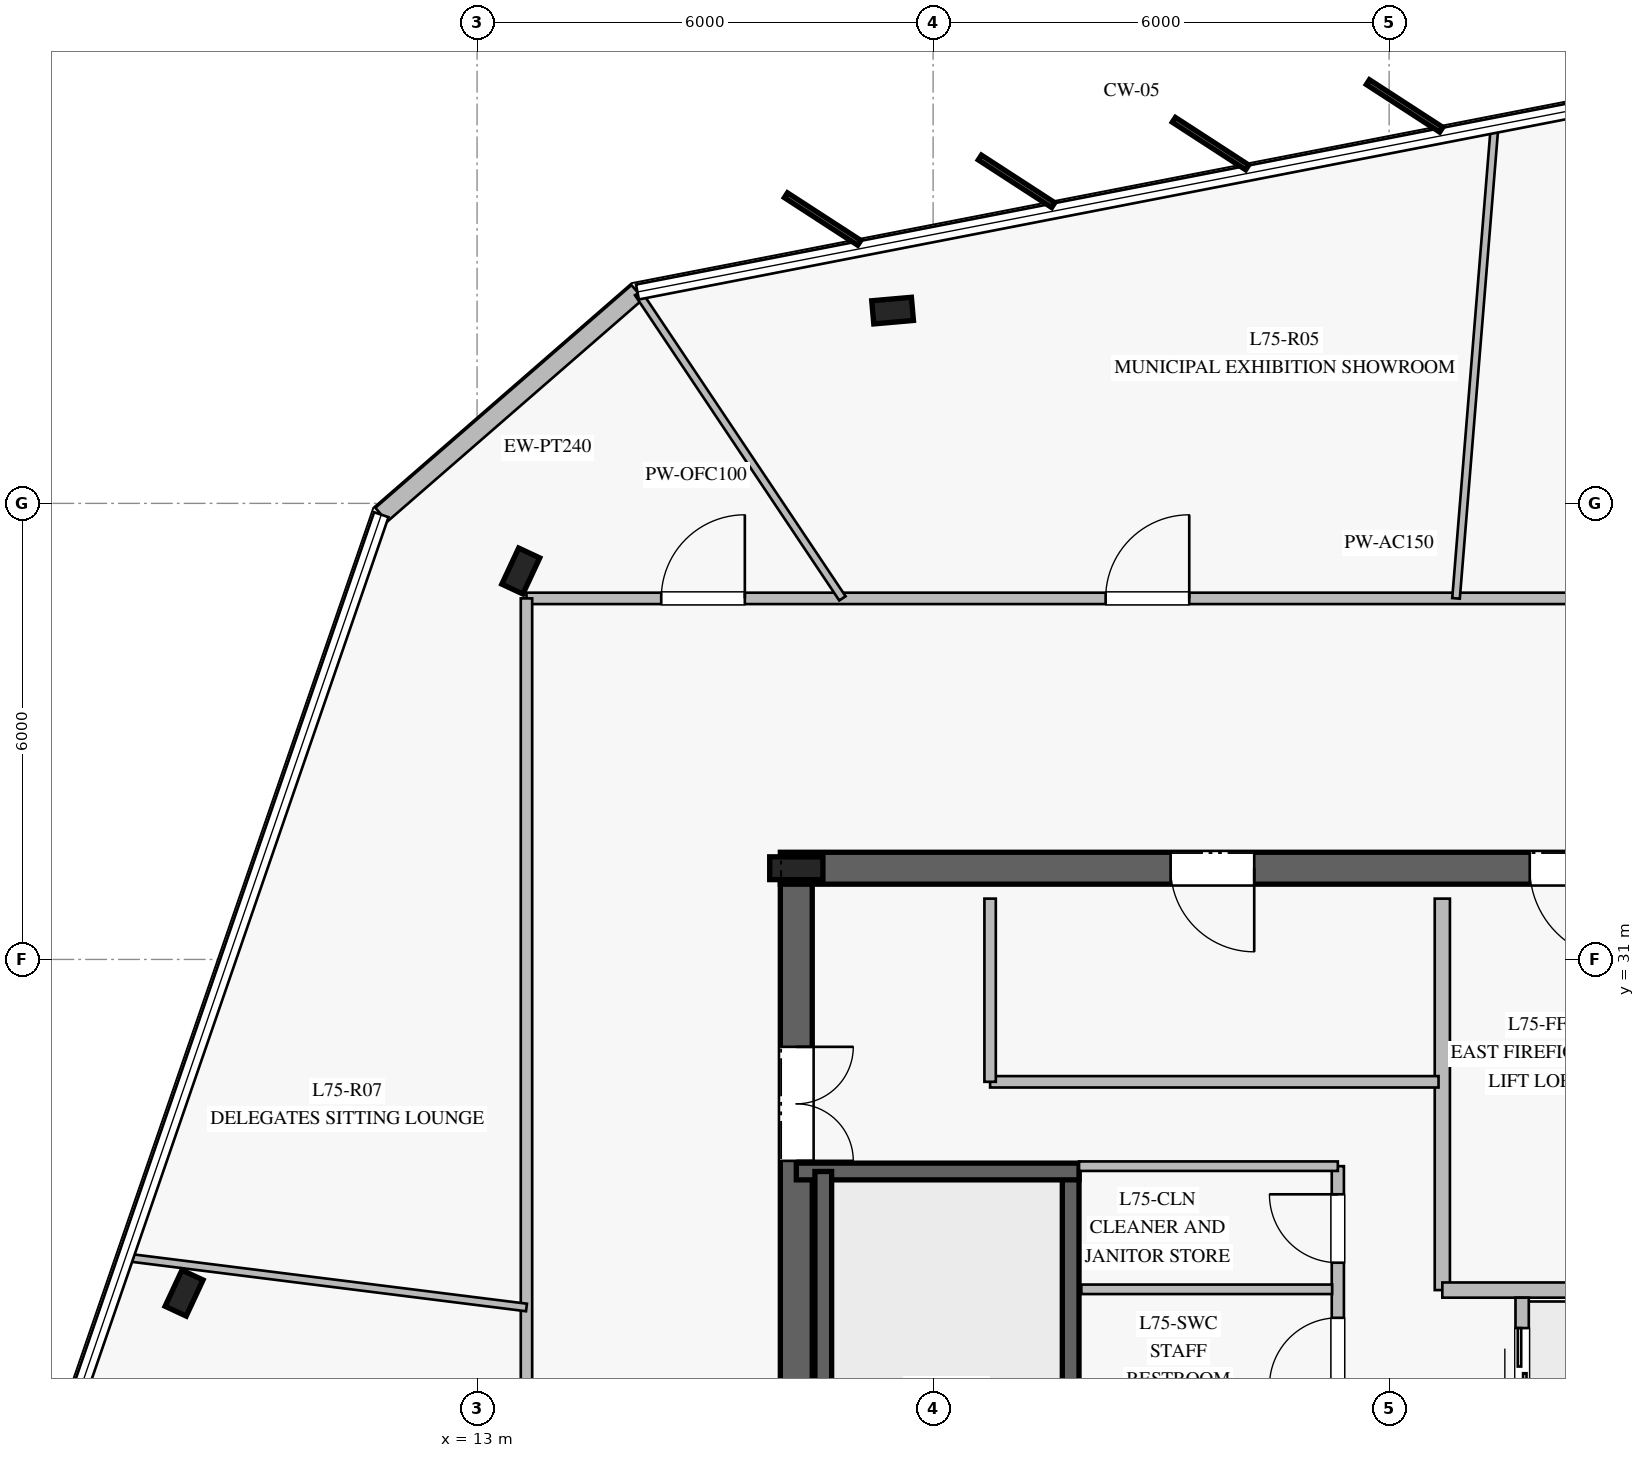
"""IFC4 building model, lengths in metres.
Left out: names, types, materials, properties, quantities, classifications, styles, units other than length and angle.
Written with IfcOpenShell. Run it as: python <this file> out.ifc"""

import sys

from ifc_helpers import new_model, si_unit, direction, frame, frame_2d, origin, origin_2d, place, context, subcontext, project, spatial, rectangle, i_section, extrude, element, fill, save


model = new_model("IFC4")
c1 = context("Model", 3, precision=1e-05, world=origin(), true_north=direction((0.0, 1.0)))
c2 = subcontext(c1, "Body", "Model", "MODEL_VIEW")
j1 = project(units=[si_unit("LENGTHUNIT", "METRE"), si_unit("PLANEANGLEUNIT", "RADIAN")], contexts=[c1])
p1 = place(None, origin())
s1 = spatial("IfcSite", under=j1, at=p1, CompositionType="ELEMENT")
p2 = place(p1, origin())
s2 = spatial("IfcBuilding", under=s1, at=p2, CompositionType="ELEMENT")
p3 = place(p2, frame((0.0, 0.0, 310.2)))
s3 = spatial("IfcBuildingStorey", under=s2, at=p3, CompositionType="ELEMENT", Elevation=310.2)
p4 = place(p3, frame((33.01, 32.2, 0.0), z_axis=(0.0, 0.0, 1.0), x_axis=(-1.0, 0.0, 0.0)))
e1 = element("IfcWall", 1, at=p4, inside=s3, PredefinedType="SHEAR", context=c2, shape_type="SweptSolid", body=[
    extrude(rectangle(XDim=16.02, YDim=0.42, at=frame_2d((8.01, 0.0))), origin(), (0.0, 0.0, 1.0), 3.78),
])
p5 = place(p4, frame((4.96, 0.0, 0.0)))
e2 = element("IfcOpeningElement", 2, at=p5, cuts=e1, PredefinedType="OPENING", context=c2, shape_type="SweptSolid", body=[
    extrude(rectangle(XDim=1.2, YDim=2.25, at=frame_2d((0.6, 1.125))), frame((0.0, 0.22, 0.0), z_axis=(0.0, -1.0, 0.0), x_axis=(1.0, 0.0, 0.0)), (0.0, 0.0, 1.0), 0.44),
])
p6 = place(p4, frame((9.785, 0.0, 0.0)))
e3 = element("IfcOpeningElement", 3, at=p6, cuts=e1, PredefinedType="OPENING", context=c2, shape_type="SweptSolid", body=[
    extrude(rectangle(XDim=1.1, YDim=2.2, at=frame_2d((0.55, 1.1))), frame((0.0, 0.22, 0.0), z_axis=(0.0, -1.0, 0.0), x_axis=(1.0, 0.0, 0.0)), (0.0, 0.0, 1.0), 0.44),
])
p7 = place(p3, frame((17.2, 31.99, 0.0), z_axis=(0.0, 0.0, 1.0), x_axis=(0.0, -1.0, 0.0)))
e4 = element("IfcWall", 4, at=p7, inside=s3, PredefinedType="SHEAR", context=c2, shape_type="SweptSolid", body=[
    extrude(rectangle(XDim=13.98, YDim=0.42, at=frame_2d((6.99, 0.0))), origin(), (0.0, 0.0, 1.0), 3.78),
])
p8 = place(p7, frame((2.14, 0.0, 0.0)))
e5 = element("IfcOpeningElement", 5, at=p8, cuts=e4, PredefinedType="OPENING", context=c2, shape_type="SweptSolid", body=[
    extrude(rectangle(XDim=1.5, YDim=2.2, at=frame_2d((0.75, 1.1))), frame((0.0, 0.22, 0.0), z_axis=(0.0, -1.0, 0.0), x_axis=(1.0, 0.0, 0.0)), (0.0, 0.0, 1.0), 0.44),
])
p9 = place(p3, frame((17.2, 32.2, 0.0), z_axis=(0.0, 0.0, 1.0), x_axis=(1.0, 0.0, 0.0)))
e6 = element("IfcColumn", 6, at=p9, inside=s3, PredefinedType="COLUMN", context=c2, shape_type="SweptSolid", body=[
    extrude(i_section(OverallWidth=0.3, OverallDepth=0.7, WebThickness=0.017, FlangeThickness=0.032, at=origin_2d()), origin(), (0.0, 0.0, 1.0), 4.0),
])
p10 = place(p3, frame((20.81, 20.99, 0.0), z_axis=(0.0, 0.0, 1.0), x_axis=(0.0, 1.0, 0.0)))
e7 = element("IfcWall", 7, at=p10, inside=s3, PredefinedType="SOLIDWALL", context=c2, shape_type="SweptSolid", body=[
    extrude(rectangle(XDim=7.22, YDim=0.22, at=frame_2d((3.61, 0.0))), origin(), (0.0, 0.0, 1.0), 3.78),
])
p11 = place(p10, frame((0.18, 0.0, 0.0)))
e8 = element("IfcOpeningElement", 8, at=p11, cuts=e7, PredefinedType="OPENING", context=c2, shape_type="SweptSolid", body=[
    extrude(rectangle(XDim=1.15, YDim=2.2, at=frame_2d((0.575, 1.1))), frame((0.0, 0.12, 0.0), z_axis=(0.0, -1.0, 0.0), x_axis=(1.0, 0.0, 0.0)), (0.0, 0.0, 1.0), 0.24),
])
p12 = place(p3, frame((17.2, 28.21, 0.0), z_axis=(0.0, 0.0, 1.0), x_axis=(1.0, 0.0, 0.0)))
e9 = element("IfcWall", 9, at=p12, inside=s3, PredefinedType="SOLIDWALL", context=c2, shape_type="SweptSolid", body=[
    extrude(rectangle(XDim=3.72, YDim=0.22, at=frame_2d((1.86, 0.0))), origin(), (0.0, 0.0, 1.0), 3.78),
])
p13 = place(p3, frame((17.555, 28.21, 0.0), z_axis=(0.0, 0.0, 1.0), x_axis=(0.0, -1.0, 0.0)))
e10 = element("IfcWall", 10, at=p13, inside=s3, PredefinedType="SOLIDWALL", context=c2, shape_type="SweptSolid", body=[
    extrude(rectangle(XDim=7.22, YDim=0.22, at=frame_2d((3.61, 0.0))), origin(), (0.0, 0.0, 1.0), 3.78),
])
for number, where, z_axis, x_axis in (
    (11, (18.467, 39.536, 0.0), (0.0, 0.0, 1.0), (0.996, 0.087, 0.0)),
    (12, (13.575, 36.11, 0.0), (0.0, 0.0, 1.0), (0.423, 0.906, 0.0)),
    (13, (9.145, 26.61, 0.0), (0.0, 0.0, 1.0), (0.423, 0.906, 0.0)),
):
    element("IfcColumn", number, at=place(p3, frame(where, z_axis=z_axis, x_axis=x_axis)), inside=s3, PredefinedType="COLUMN", context=c2, shape_type="SweptSolid", body=[
        extrude(i_section(OverallWidth=0.306, OverallDepth=0.524, WebThickness=0.021, FlangeThickness=0.04, at=origin_2d()), origin(), (0.0, 0.0, 1.0), 4.0),
    ])
p14 = place(p3, frame((15.11, 39.781, 0.0), z_axis=(0.0, 0.0, 1.0), x_axis=(-0.754672605899, -0.656101560663, 0.0)))
e14 = element("IfcWall", 14, at=p14, inside=s3, PredefinedType="STANDARD", context=c2, shape_type="SweptSolid", body=[
    extrude(rectangle(XDim=4.466, YDim=0.24, at=frame_2d((2.233, 0.0))), origin(), (0.0, 0.0, 1.0), 3.78),
])
p15 = place(p3, frame((25.7, 26.65, 0.0), z_axis=(0.0, 0.0, 1.0), x_axis=(0.0, 1.0, 0.0)))
e15 = element("IfcWall", 15, at=p15, inside=s3, PredefinedType="PARTITIONING", context=c2, shape_type="SweptSolid", body=[
    extrude(rectangle(XDim=5.15, YDim=0.2, at=frame_2d((2.575, 0.0))), origin(), (0.0, 0.0, 1.0), 3.78),
])
p16 = place(p3, frame((25.7, 26.65, 0.0), z_axis=(0.0, 0.0, 1.0), x_axis=(1.0, 0.0, 0.0)))
e16 = element("IfcWall", 16, at=p16, inside=s3, PredefinedType="PARTITIONING", context=c2, shape_type="SweptSolid", body=[
    extrude(rectangle(XDim=3.38, YDim=0.2, at=frame_2d((1.69, 0.0))), origin(), (0.0, 0.0, 1.0), 3.78),
])
p17 = place(p3, frame((24.325, 23.35, 0.0), z_axis=(0.0, 0.0, 1.0), x_axis=(0.0, 1.0, 0.0)))
e17 = element("IfcWall", 17, at=p17, inside=s3, PredefinedType="PLUMBINGWALL", context=c2, shape_type="SweptSolid", body=[
    extrude(rectangle(XDim=4.93, YDim=0.16, at=frame_2d((2.465, 0.0))), origin(), (0.0, 0.0, 1.0), 3.78),
])
p18 = place(p17, frame((0.375, 0.0, 0.0)))
e18 = element("IfcOpeningElement", 18, at=p18, cuts=e17, PredefinedType="OPENING", context=c2, shape_type="SweptSolid", body=[
    extrude(rectangle(XDim=0.95, YDim=2.1, at=frame_2d((0.475, 1.05))), frame((0.0, 0.09, 0.0), z_axis=(0.0, -1.0, 0.0), x_axis=(1.0, 0.0, 0.0)), (0.0, 0.0, 1.0), 0.18),
])
p19 = place(p17, frame((2.035, 0.0, 0.0)))
e19 = element("IfcOpeningElement", 19, at=p19, cuts=e17, PredefinedType="OPENING", context=c2, shape_type="SweptSolid", body=[
    extrude(rectangle(XDim=0.9, YDim=2.1, at=frame_2d((0.45, 1.05))), frame((0.0, 0.09, 0.0), z_axis=(0.0, -1.0, 0.0), x_axis=(1.0, 0.0, 0.0)), (0.0, 0.0, 1.0), 0.18),
])
p20 = place(p17, frame((3.66, 0.0, 0.0)))
e20 = element("IfcOpeningElement", 20, at=p20, cuts=e17, PredefinedType="OPENING", context=c2, shape_type="SweptSolid", body=[
    extrude(rectangle(XDim=0.9, YDim=2.1, at=frame_2d((0.45, 1.05))), frame((0.0, 0.09, 0.0), z_axis=(0.0, -1.0, 0.0), x_axis=(1.0, 0.0, 0.0)), (0.0, 0.0, 1.0), 0.18),
])
p21 = place(p3, frame((20.92, 28.28, 0.0), z_axis=(0.0, 0.0, 1.0), x_axis=(1.0, 0.0, 0.0)))
e21 = element("IfcWall", 21, at=p21, inside=s3, PredefinedType="PARTITIONING", context=c2, shape_type="SweptSolid", body=[
    extrude(rectangle(XDim=3.405, YDim=0.125, at=frame_2d((1.703, 0.0))), origin(), (0.0, 0.0, 1.0), 3.78),
])
p22 = place(p3, frame((20.95, 26.66, 0.0), z_axis=(0.0, 0.0, 1.0), x_axis=(1.0, 0.0, 0.0)))
e22 = element("IfcWall", 22, at=p22, inside=s3, PredefinedType="PARTITIONING", context=c2, shape_type="SweptSolid", body=[
    extrude(rectangle(XDim=3.3, YDim=0.125, at=frame_2d((1.65, 0.0))), origin(), (0.0, 0.0, 1.0), 3.78),
])
p23 = place(p3, frame((19.75, 29.39, 0.0), z_axis=(0.0, 0.0, 1.0), x_axis=(1.0, 0.0, 0.0)))
e23 = element("IfcWall", 23, at=p23, inside=s3, PredefinedType="PARTITIONING", context=c2, shape_type="SweptSolid", body=[
    extrude(rectangle(XDim=5.9, YDim=0.15, at=frame_2d((2.95, 0.0))), origin(), (0.0, 0.0, 1.0), 3.78),
])
p24 = place(p3, frame((19.75, 29.39, 0.0), z_axis=(0.0, 0.0, 1.0), x_axis=(0.0, 1.0, 0.0)))
e24 = element("IfcWall", 24, at=p24, inside=s3, PredefinedType="PARTITIONING", context=c2, shape_type="SweptSolid", body=[
    extrude(rectangle(XDim=2.41, YDim=0.15, at=frame_2d((1.205, 0.0))), origin(), (0.0, 0.0, 1.0), 3.78),
])
p25 = place(p3, frame((26.75, 24.65, 0.0), z_axis=(0.0, 0.0, 1.0), x_axis=(0.0, 1.0, 0.0)))
e25 = element("IfcWall", 25, at=p25, inside=s3, PredefinedType="PARTITIONING", context=c2, shape_type="SweptSolid", body=[
    extrude(rectangle(XDim=1.9, YDim=0.175, at=frame_2d((0.95, 0.0))), origin(), (0.0, 0.0, 1.0), 3.78),
])
p26 = place(p25, frame((0.4, 0.0, 0.0)))
e26 = element("IfcOpeningElement", 26, at=p26, cuts=e25, PredefinedType="OPENING", context=c2, shape_type="SweptSolid", body=[
    extrude(rectangle(XDim=1.1, YDim=2.2, at=frame_2d((0.55, 1.1))), frame((0.0, 0.098, 0.0), z_axis=(0.0, -1.0, 0.0), x_axis=(1.0, 0.0, 0.0)), (0.0, 0.0, 1.0), 0.195),
])
p27 = place(p3, frame((13.65, 35.75, 0.0), z_axis=(0.0, 0.0, 1.0), x_axis=(1.0, 0.0, 0.0)))
e27 = element("IfcWall", 27, at=p27, inside=s3, PredefinedType="PARTITIONING", context=c2, shape_type="SweptSolid", body=[
    extrude(rectangle(XDim=22.7, YDim=0.15, at=frame_2d((11.35, 0.0))), origin(), (0.0, 0.0, 1.0), 3.28),
])
p28 = place(p27, frame((7.62, 0.0, 0.0)))
e28 = element("IfcOpeningElement", 28, at=p28, cuts=e27, PredefinedType="OPENING", context=c2, shape_type="SweptSolid", body=[
    extrude(rectangle(XDim=1.1, YDim=2.2, at=frame_2d((0.55, 1.1))), frame((0.0, 0.085, 0.0), z_axis=(0.0, -1.0, 0.0), x_axis=(1.0, 0.0, 0.0)), (0.0, 0.0, 1.0), 0.17),
])
p29 = place(p27, frame((16.645, 0.0, 0.0)))
e29 = element("IfcOpeningElement", 29, at=p29, cuts=e27, PredefinedType="OPENING", context=c2, shape_type="SweptSolid", body=[
    extrude(rectangle(XDim=1.1, YDim=2.2, at=frame_2d((0.55, 1.1))), frame((0.0, 0.085, 0.0), z_axis=(0.0, -1.0, 0.0), x_axis=(1.0, 0.0, 0.0)), (0.0, 0.0, 1.0), 0.17),
])
p30 = place(p27, frame((1.773, 0.0, 0.0)))
e30 = element("IfcOpeningElement", 30, at=p30, cuts=e27, PredefinedType="OPENING", context=c2, shape_type="SweptSolid", body=[
    extrude(rectangle(XDim=1.1, YDim=2.2, at=frame_2d((0.55, 1.1))), frame((0.0, 0.085, 0.0), z_axis=(0.0, -1.0, 0.0), x_axis=(1.0, 0.0, 0.0)), (0.0, 0.0, 1.0), 0.17),
])
p31 = place(p3, frame((13.65, 14.25, 0.0), z_axis=(0.0, 0.0, 1.0), x_axis=(0.0, 1.0, 0.0)))
e31 = element("IfcWall", 31, at=p31, inside=s3, PredefinedType="PARTITIONING", context=c2, shape_type="SweptSolid", body=[
    extrude(rectangle(XDim=21.5, YDim=0.15, at=frame_2d((10.75, 0.0))), origin(), (0.0, 0.0, 1.0), 3.28),
])
p32 = place(p31, frame((5.723, 0.0, 0.0)))
e32 = element("IfcOpeningElement", 32, at=p32, cuts=e31, PredefinedType="OPENING", context=c2, shape_type="SweptSolid", body=[
    extrude(rectangle(XDim=1.1, YDim=2.2, at=frame_2d((0.55, 1.1))), frame((0.0, 0.085, 0.0), z_axis=(0.0, -1.0, 0.0), x_axis=(1.0, 0.0, 0.0)), (0.0, 0.0, 1.0), 0.17),
])
p33 = place(p3, frame((17.807, 35.75, 0.0), z_axis=(0.0, 0.0, 1.0), x_axis=(-0.556214847817, 0.831038532842, 0.0)))
e33 = element("IfcWall", 33, at=p33, inside=s3, PredefinedType="MOVABLE", context=c2, shape_type="SweptSolid", body=[
    extrude(rectangle(XDim=4.833, YDim=0.1, at=frame_2d((2.417, 0.0))), origin(), (0.0, 0.0, 1.0), 3.28),
])
p34 = place(p3, frame((13.65, 26.421, 0.0), z_axis=(0.0, 0.0, 1.0), x_axis=(-0.992232445965, 0.12439764135, 0.0)))
e34 = element("IfcWall", 34, at=p34, inside=s3, PredefinedType="MOVABLE", context=c2, shape_type="SweptSolid", body=[
    extrude(rectangle(XDim=5.299, YDim=0.1, at=frame_2d((2.649, 0.0))), origin(), (0.0, 0.0, 1.0), 3.28),
])
p35 = place(p3, frame((25.88, 35.75, 0.0), z_axis=(0.0, 0.0, 1.0), x_axis=(0.081435932635, 0.996678578518, 0.0)))
e35 = element("IfcWall", 35, at=p35, inside=s3, PredefinedType="MOVABLE", context=c2, shape_type="SweptSolid", body=[
    extrude(rectangle(XDim=6.227, YDim=0.1, at=frame_2d((3.113, 0.0))), origin(), (0.0, 0.0, 1.0), 3.28),
])
p36 = place(p5, origin())
e36 = element("IfcDoor", 36, at=p36, inside=s3, OperationType="SINGLE_SWING_LEFT", PredefinedType="DOOR", context=c2, shape_type="SweptSolid", body=[
    extrude(rectangle(XDim=1.2, YDim=2.25, at=frame_2d((0.6, 1.125))), frame((0.0, 0.025, 0.0), z_axis=(0.0, -1.0, 0.0), x_axis=(1.0, 0.0, 0.0)), (0.0, 0.0, 1.0), 0.05),
])
fill(e2, e36)
p37 = place(p8, origin())
e37 = element("IfcDoor", 37, at=p37, inside=s3, OperationType="DOUBLE_DOOR_SINGLE_SWING", PredefinedType="DOOR", context=c2, shape_type="SweptSolid", body=[
    extrude(rectangle(XDim=1.5, YDim=2.2, at=frame_2d((0.75, 1.1))), frame((0.0, 0.025, 0.0), z_axis=(0.0, -1.0, 0.0), x_axis=(1.0, 0.0, 0.0)), (0.0, 0.0, 1.0), 0.05),
])
fill(e5, e37)
p38 = place(p19, origin())
e38 = element("IfcDoor", 38, at=p38, inside=s3, OperationType="SINGLE_SWING_LEFT", PredefinedType="DOOR", context=c2, shape_type="SweptSolid", body=[
    extrude(rectangle(XDim=0.9, YDim=2.1, at=frame_2d((0.45, 1.05))), frame((0.0, 0.025, 0.0), z_axis=(0.0, -1.0, 0.0), x_axis=(1.0, 0.0, 0.0)), (0.0, 0.0, 1.0), 0.05),
])
fill(e19, e38)
p39 = place(p20, origin())
e39 = element("IfcDoor", 39, at=p39, inside=s3, OperationType="SINGLE_SWING_RIGHT", PredefinedType="DOOR", context=c2, shape_type="SweptSolid", body=[
    extrude(rectangle(XDim=0.9, YDim=2.1, at=frame_2d((0.45, 1.05))), frame((0.0, 0.025, 0.0), z_axis=(0.0, -1.0, 0.0), x_axis=(1.0, 0.0, 0.0)), (0.0, 0.0, 1.0), 0.05),
])
fill(e20, e39)
p40 = place(p6, origin())
e40 = element("IfcDoor", 40, at=p40, inside=s3, OperationType="SINGLE_SWING_LEFT", PredefinedType="DOOR", context=c2, shape_type="SweptSolid", body=[
    extrude(rectangle(XDim=1.1, YDim=2.2, at=frame_2d((0.55, 1.1))), frame((0.0, 0.025, 0.0), z_axis=(0.0, -1.0, 0.0), x_axis=(1.0, 0.0, 0.0)), (0.0, 0.0, 1.0), 0.05),
])
fill(e3, e40)
p41 = place(p26, origin())
e41 = element("IfcDoor", 41, at=p41, inside=s3, OperationType="DOUBLE_DOOR_SLIDING", PredefinedType="DOOR", context=c2, shape_type="SweptSolid", body=[
    extrude(rectangle(XDim=1.1, YDim=2.2, at=frame_2d((0.55, 1.1))), frame((0.0, 0.025, 0.0), z_axis=(0.0, -1.0, 0.0), x_axis=(1.0, 0.0, 0.0)), (0.0, 0.0, 1.0), 0.05),
])
fill(e26, e41)
p42 = place(p28, origin())
e42 = element("IfcDoor", 42, at=p42, inside=s3, OperationType="SINGLE_SWING_RIGHT", PredefinedType="DOOR", context=c2, shape_type="SweptSolid", body=[
    extrude(rectangle(XDim=1.1, YDim=2.2, at=frame_2d((0.55, 1.1))), frame((0.0, 0.025, 0.0), z_axis=(0.0, -1.0, 0.0), x_axis=(1.0, 0.0, 0.0)), (0.0, 0.0, 1.0), 0.05),
])
fill(e28, e42)
p43 = place(p30, origin())
e43 = element("IfcDoor", 43, at=p43, inside=s3, OperationType="SINGLE_SWING_RIGHT", PredefinedType="DOOR", context=c2, shape_type="SweptSolid", body=[
    extrude(rectangle(XDim=1.1, YDim=2.2, at=frame_2d((0.55, 1.1))), frame((0.0, 0.025, 0.0), z_axis=(0.0, -1.0, 0.0), x_axis=(1.0, 0.0, 0.0)), (0.0, 0.0, 1.0), 0.05),
])
fill(e30, e43)
save(model, sys.argv[1])
